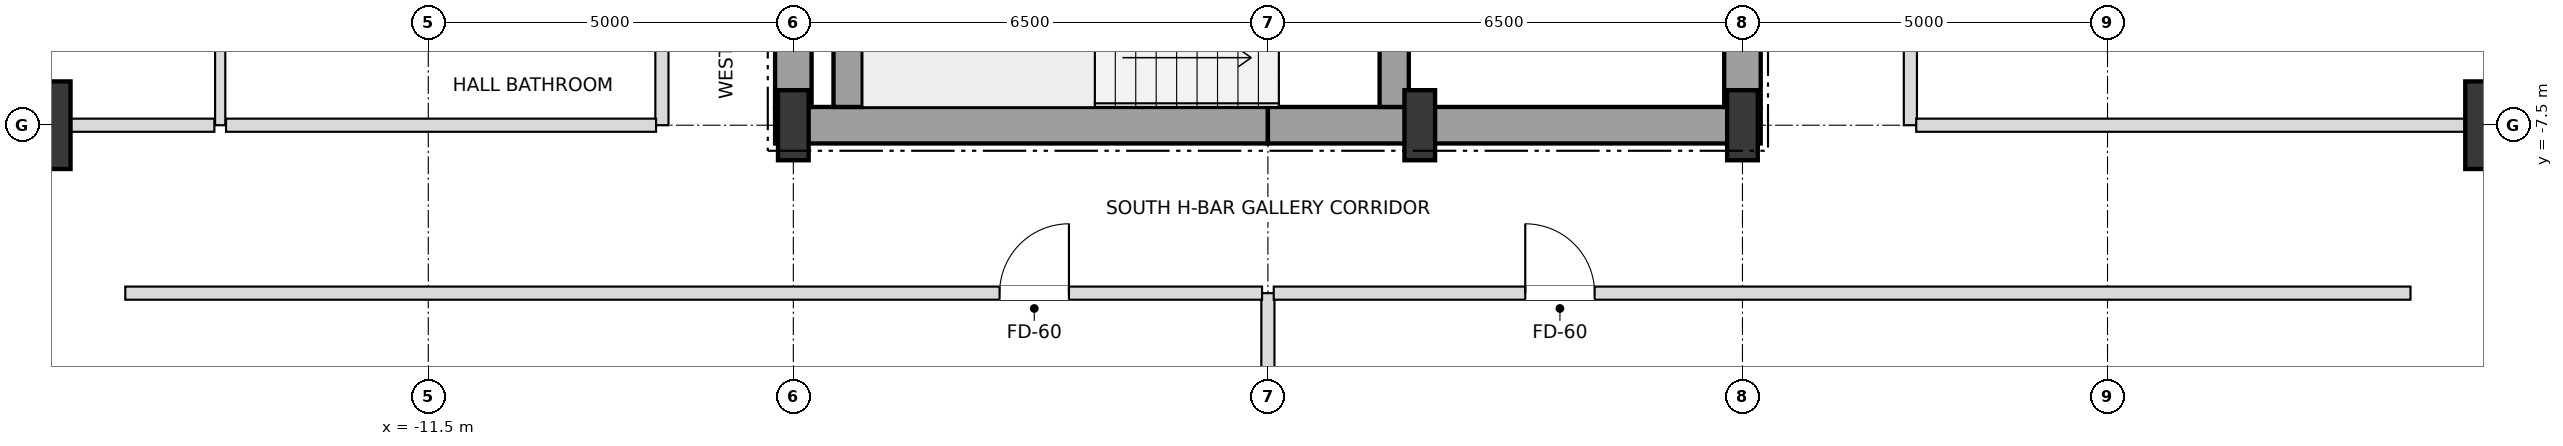
"""IFC4 building model, lengths in metres.
Left out: names, types, materials, properties, quantities, classifications, styles, units other than length and angle.
Written with IfcOpenShell. Run it as: python <this file> out.ifc"""

import sys

from ifc_helpers import new_model, si_unit, direction, frame, frame_2d, origin, origin_2d, place, context, subcontext, project, spatial, rectangle, i_section, extrude, element, fill, save


model = new_model("IFC4")
c1 = context("Model", 3, precision=1e-05, world=origin(), true_north=direction((0.0, 1.0)))
c2 = subcontext(c1, "Body", "Model", "MODEL_VIEW")
j1 = project(units=[si_unit("LENGTHUNIT", "METRE"), si_unit("PLANEANGLEUNIT", "RADIAN")], contexts=[c1])
p1 = place(None, origin())
s1 = spatial("IfcSite", under=j1, at=p1, CompositionType="ELEMENT")
p2 = place(p1, origin())
s2 = spatial("IfcBuilding", under=s1, at=p2, CompositionType="ELEMENT")
p3 = place(p2, frame((0.0, 0.0, 129.6)))
s3 = spatial("IfcBuildingStorey", under=s2, at=p3, CompositionType="ELEMENT", Elevation=129.6)
for number, where, z_axis, x_axis in (
    (1, (-6.5, -7.5, 0.0), (0.0, 0.0, 1.0), (1.0, 0.0, 0.0)),
    (2, (2.08, -7.5, 0.0), (0.0, 0.0, 1.0), (1.0, 0.0, 0.0)),
    (3, (6.5, -7.5, 0.0), (0.0, 0.0, 1.0), (1.0, 0.0, 0.0)),
):
    element("IfcColumn", number, at=place(p3, frame(where, z_axis=z_axis, x_axis=x_axis)), inside=s3, PredefinedType="COLUMN", context=c2, shape_type="SweptSolid", body=[
        extrude(i_section(OverallWidth=0.42, OverallDepth=0.96, WebThickness=0.022, FlangeThickness=0.034, at=origin_2d()), origin(), (0.0, 0.0, 1.0), 3.6),
    ])
for number, where, z_axis, x_axis in (
    (4, (17.0, -7.5, 0.0), (0.0, 0.0, 1.0), (1.0, 0.0, 0.0)),
    (5, (-17.0, -7.5, 0.0), (0.0, 0.0, 1.0), (1.0, 0.0, 0.0)),
):
    element("IfcColumn", number, at=place(p3, frame(where, z_axis=z_axis, x_axis=x_axis)), inside=s3, PredefinedType="USERDEFINED", context=c2, shape_type="SweptSolid", body=[
        extrude(rectangle(XDim=1.2, YDim=1.2, at=origin_2d()), origin(), (0.0, 0.0, 1.0), 3.6),
    ])
for number, where, z_axis, x_axis in (
    (6, (-6.75, -7.5, 0.0), (0.0, 0.0, 1.0), (1.0, 0.0, 0.0)),
    (7, (0.0, -7.5, 0.0), (0.0, 0.0, 1.0), (1.0, 0.0, 0.0)),
):
    element("IfcWall", number, at=place(p3, frame(where, z_axis=z_axis, x_axis=x_axis)), inside=s3, PredefinedType="SHEAR", context=c2, shape_type="SweptSolid", body=[
        extrude(rectangle(XDim=6.75, YDim=0.5, at=frame_2d((3.375, 0.0))), origin(), (0.0, 0.0, 1.0), 3.38),
    ])
p4 = place(p3, frame((-6.5, -7.25, 0.0), z_axis=(0.0, 0.0, 1.0), x_axis=(0.0, 1.0, 0.0)))
e8 = element("IfcWall", 8, at=p4, inside=s3, PredefinedType="SHEAR", context=c2, shape_type="SweptSolid", body=[
    extrude(rectangle(XDim=3.55, YDim=0.5, at=frame_2d((1.775, 0.0))), origin(), (0.0, 0.0, 1.0), 3.38),
])
p5 = place(p3, frame((6.5, -7.25, 0.0), z_axis=(0.0, 0.0, 1.0), x_axis=(0.0, 1.0, 0.0)))
e9 = element("IfcWall", 9, at=p5, inside=s3, PredefinedType="SHEAR", context=c2, shape_type="SweptSolid", body=[
    extrude(rectangle(XDim=5.75, YDim=0.5, at=frame_2d((2.875, 0.0))), origin(), (0.0, 0.0, 1.0), 3.38),
])
p6 = place(p5, frame((0.85, 0.0, 0.0)))
e10 = element("IfcOpeningElement", 10, at=p6, cuts=e9, PredefinedType="OPENING", context=c2, shape_type="SweptSolid", body=[
    extrude(rectangle(XDim=1.05, YDim=2.15, at=frame_2d((0.525, 1.075))), frame((0.0, 0.26, 0.0), z_axis=(0.0, -1.0, 0.0), x_axis=(1.0, 0.0, 0.0)), (0.0, 0.0, 1.0), 0.52),
])
p7 = place(p3, frame((-5.75, -7.25, 0.0), z_axis=(0.0, 0.0, 1.0), x_axis=(0.0, 1.0, 0.0)))
e11 = element("IfcWall", 11, at=p7, inside=s3, PredefinedType="SHEAR", context=c2, shape_type="SweptSolid", body=[
    extrude(rectangle(XDim=2.9, YDim=0.4, at=frame_2d((1.45, 0.0))), origin(), (0.0, 0.0, 1.0), 3.38),
])
p8 = place(p3, frame((1.73, -7.25, 0.0), z_axis=(0.0, 0.0, 1.0), x_axis=(0.0, 1.0, 0.0)))
e12 = element("IfcWall", 12, at=p8, inside=s3, PredefinedType="SHEAR", context=c2, shape_type="SweptSolid", body=[
    extrude(rectangle(XDim=3.3, YDim=0.4, at=frame_2d((1.65, 0.0))), origin(), (0.0, 0.0, 1.0), 3.38),
])
p9 = place(p8, frame((0.9, 0.0, 0.0)))
e13 = element("IfcOpeningElement", 13, at=p9, cuts=e12, PredefinedType="OPENING", context=c2, shape_type="SweptSolid", body=[
    extrude(rectangle(XDim=1.05, YDim=2.15, at=frame_2d((0.525, 1.075))), frame((0.0, 0.21, 0.0), z_axis=(0.0, -1.0, 0.0), x_axis=(1.0, 0.0, 0.0)), (0.0, 0.0, 1.0), 0.42),
])
p10 = place(p3, frame((-14.35, -7.5, 0.0), z_axis=(0.0, 0.0, 1.0), x_axis=(0.0, 1.0, 0.0)))
e14 = element("IfcWall", 14, at=p10, inside=s3, PredefinedType="PARTITIONING", context=c2, shape_type="SweptSolid", body=[
    extrude(rectangle(XDim=15.0, YDim=0.14, at=frame_2d((7.5, 0.0))), origin(), (0.0, 0.0, 1.0), 3.38),
])
p11 = place(p10, frame((3.475, 0.0, 0.0)))
e15 = element("IfcOpeningElement", 15, at=p11, cuts=e14, PredefinedType="OPENING", context=c2, shape_type="SweptSolid", body=[
    extrude(rectangle(XDim=0.95, YDim=2.1, at=frame_2d((0.475, 1.05))), frame((0.0, 0.08, 0.0), z_axis=(0.0, -1.0, 0.0), x_axis=(1.0, 0.0, 0.0)), (0.0, 0.0, 1.0), 0.16),
])
p12 = place(p3, frame((-8.3, -7.5, 0.0), z_axis=(0.0, 0.0, 1.0), x_axis=(0.0, 1.0, 0.0)))
e16 = element("IfcWall", 16, at=p12, inside=s3, PredefinedType="PARTITIONING", context=c2, shape_type="SweptSolid", body=[
    extrude(rectangle(XDim=15.0, YDim=0.18, at=frame_2d((7.5, 0.0))), origin(), (0.0, 0.0, 1.0), 3.38),
])
p13 = place(p12, frame((2.495, 0.0, 0.0)))
e17 = element("IfcOpeningElement", 17, at=p13, cuts=e16, PredefinedType="OPENING", context=c2, shape_type="SweptSolid", body=[
    extrude(rectangle(XDim=0.95, YDim=2.15, at=frame_2d((0.475, 1.075))), frame((0.0, 0.1, 0.0), z_axis=(0.0, -1.0, 0.0), x_axis=(1.0, 0.0, 0.0)), (0.0, 0.0, 1.0), 0.2),
])
p14 = place(p3, frame((0.0, -23.15, 0.0), z_axis=(0.0, 0.0, 1.0), x_axis=(0.0, 1.0, 0.0)))
e18 = element("IfcWall", 18, at=p14, inside=s3, PredefinedType="PARTITIONING", context=c2, shape_type="SweptSolid", body=[
    extrude(rectangle(XDim=13.35, YDim=0.18, at=frame_2d((6.675, 0.0))), origin(), (0.0, 0.0, 1.0), 2.816),
])
p15 = place(p3, frame((8.8, -7.5, 0.0), z_axis=(0.0, 0.0, 1.0), x_axis=(0.0, 1.0, 0.0)))
e19 = element("IfcWall", 19, at=p15, inside=s3, PredefinedType="PARTITIONING", context=c2, shape_type="SweptSolid", body=[
    extrude(rectangle(XDim=15.0, YDim=0.18, at=frame_2d((7.5, 0.0))), origin(), (0.0, 0.0, 1.0), 3.38),
])
p16 = place(p15, frame((2.425, 0.0, 0.0)))
e20 = element("IfcOpeningElement", 20, at=p16, cuts=e19, PredefinedType="OPENING", context=c2, shape_type="SweptSolid", body=[
    extrude(rectangle(XDim=0.95, YDim=2.15, at=frame_2d((0.475, 1.075))), frame((0.0, 0.1, 0.0), z_axis=(0.0, -1.0, 0.0), x_axis=(1.0, 0.0, 0.0)), (0.0, 0.0, 1.0), 0.2),
])
p17 = place(p15, frame((7.525, 0.0, 0.0)))
e21 = element("IfcOpeningElement", 21, at=p17, cuts=e19, PredefinedType="OPENING", context=c2, shape_type="SweptSolid", body=[
    extrude(rectangle(XDim=0.95, YDim=2.15, at=frame_2d((0.475, 1.075))), frame((0.0, 0.1, 0.0), z_axis=(0.0, -1.0, 0.0), x_axis=(1.0, 0.0, 0.0)), (0.0, 0.0, 1.0), 0.2),
])
p18 = place(p15, frame((12.225, 0.0, 0.0)))
e22 = element("IfcOpeningElement", 22, at=p18, cuts=e19, PredefinedType="OPENING", context=c2, shape_type="SweptSolid", body=[
    extrude(rectangle(XDim=0.95, YDim=2.15, at=frame_2d((0.475, 1.075))), frame((0.0, 0.1, 0.0), z_axis=(0.0, -1.0, 0.0), x_axis=(1.0, 0.0, 0.0)), (0.0, 0.0, 1.0), 0.2),
])
p19 = place(p3, frame((-15.65, -9.8, 0.0), z_axis=(0.0, 0.0, 1.0), x_axis=(1.0, 0.0, 0.0)))
e23 = element("IfcWall", 23, at=p19, inside=s3, PredefinedType="PARTITIONING", context=c2, shape_type="SweptSolid", body=[
    extrude(rectangle(XDim=15.57, YDim=0.18, at=frame_2d((7.785, 0.0))), origin(), (0.0, 0.0, 1.0), 2.816),
])
p20 = place(p19, frame((11.975, 0.0, 0.0)))
e24 = element("IfcOpeningElement", 24, at=p20, cuts=e23, PredefinedType="OPENING", context=c2, shape_type="SweptSolid", body=[
    extrude(rectangle(XDim=0.95, YDim=2.15, at=frame_2d((0.475, 1.075))), frame((0.0, 0.1, 0.0), z_axis=(0.0, -1.0, 0.0), x_axis=(1.0, 0.0, 0.0)), (0.0, 0.0, 1.0), 0.2),
])
p21 = place(p3, frame((0.08, -9.8, 0.0), z_axis=(0.0, 0.0, 1.0), x_axis=(1.0, 0.0, 0.0)))
e25 = element("IfcWall", 25, at=p21, inside=s3, PredefinedType="PARTITIONING", context=c2, shape_type="SweptSolid", body=[
    extrude(rectangle(XDim=15.57, YDim=0.18, at=frame_2d((7.785, 0.0))), origin(), (0.0, 0.0, 1.0), 2.816),
])
p22 = place(p21, frame((3.445, 0.0, 0.0)))
e26 = element("IfcOpeningElement", 26, at=p22, cuts=e25, PredefinedType="OPENING", context=c2, shape_type="SweptSolid", body=[
    extrude(rectangle(XDim=0.95, YDim=2.15, at=frame_2d((0.475, 1.075))), frame((0.0, 0.1, 0.0), z_axis=(0.0, -1.0, 0.0), x_axis=(1.0, 0.0, 0.0)), (0.0, 0.0, 1.0), 0.2),
])
p23 = place(p3, frame((-20.15, -7.5, 0.0), z_axis=(0.0, 0.0, 1.0), x_axis=(1.0, 0.0, 0.0)))
e27 = element("IfcWall", 27, at=p23, inside=s3, PredefinedType="PARTITIONING", context=c2, shape_type="SweptSolid", body=[
    extrude(rectangle(XDim=5.72, YDim=0.18, at=frame_2d((2.86, 0.0))), origin(), (0.0, 0.0, 1.0), 2.816),
])
p24 = place(p3, frame((-14.27, -7.5, 0.0), z_axis=(0.0, 0.0, 1.0), x_axis=(1.0, 0.0, 0.0)))
e28 = element("IfcWall", 28, at=p24, inside=s3, PredefinedType="PARTITIONING", context=c2, shape_type="SweptSolid", body=[
    extrude(rectangle(XDim=5.89, YDim=0.18, at=frame_2d((2.945, 0.0))), origin(), (0.0, 0.0, 1.0), 2.816),
])
p25 = place(p3, frame((8.88, -7.5, 0.0), z_axis=(0.0, 0.0, 1.0), x_axis=(1.0, 0.0, 0.0)))
e29 = element("IfcWall", 29, at=p25, inside=s3, PredefinedType="PARTITIONING", context=c2, shape_type="SweptSolid", body=[
    extrude(rectangle(XDim=11.27, YDim=0.18, at=frame_2d((5.635, 0.0))), origin(), (0.0, 0.0, 1.0), 2.816),
])
p26 = place(p20, origin())
e30 = element("IfcDoor", 30, at=p26, inside=s3, OperationType="SINGLE_SWING_RIGHT", PredefinedType="DOOR", context=c2, shape_type="SweptSolid", body=[
    extrude(rectangle(XDim=0.95, YDim=2.15, at=frame_2d((0.475, 1.075))), frame((0.0, 0.025, 0.0), z_axis=(0.0, -1.0, 0.0), x_axis=(1.0, 0.0, 0.0)), (0.0, 0.0, 1.0), 0.05),
])
fill(e24, e30)
p27 = place(p22, origin())
e31 = element("IfcDoor", 31, at=p27, inside=s3, OperationType="SINGLE_SWING_LEFT", PredefinedType="DOOR", context=c2, shape_type="SweptSolid", body=[
    extrude(rectangle(XDim=0.95, YDim=2.15, at=frame_2d((0.475, 1.075))), frame((0.0, 0.025, 0.0), z_axis=(0.0, -1.0, 0.0), x_axis=(1.0, 0.0, 0.0)), (0.0, 0.0, 1.0), 0.05),
])
fill(e26, e31)
save(model, sys.argv[1])
